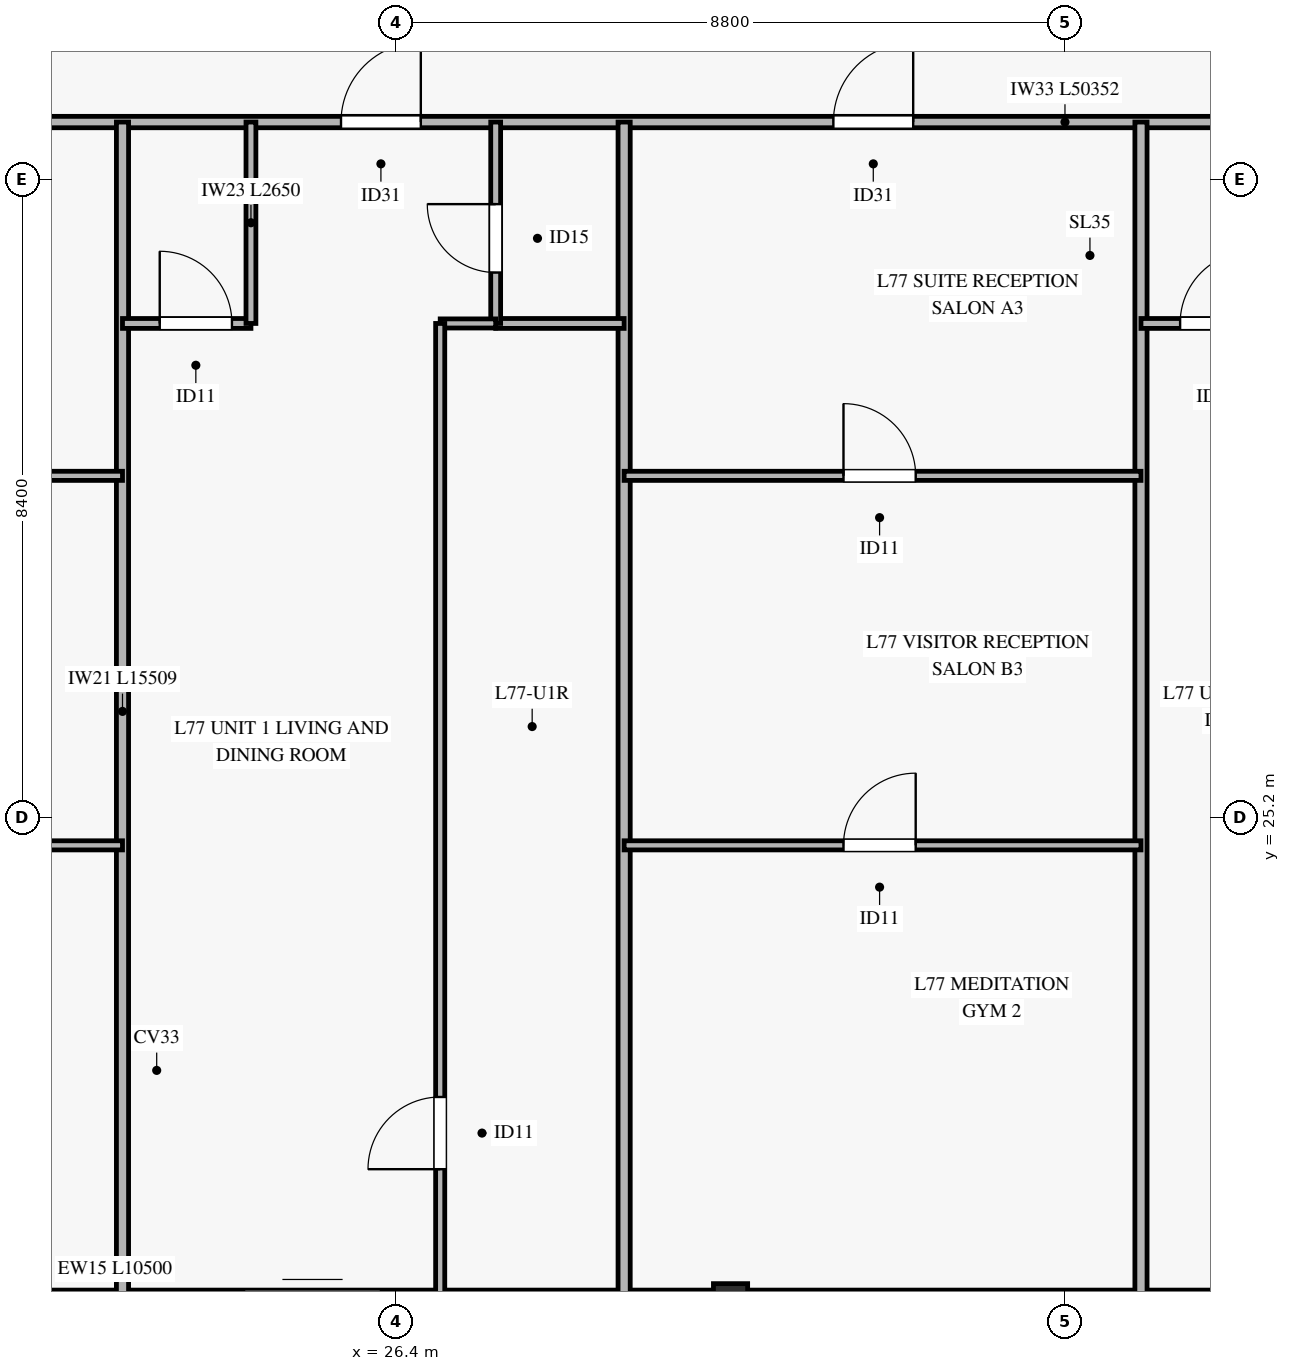
"""IFC4 building model, lengths in metres.
Left out: names, types, materials, properties, quantities, classifications, styles, units other than length and angle.
Written with IfcOpenShell. Run it as: python <this file> out.ifc"""

import sys

from ifc_helpers import new_model, si_unit, direction, frame, frame_2d, origin, origin_2d, place, context, subcontext, project, spatial, rectangle, hollow_rectangle, extrude, source, transform, mapped, element, fill, save


model = new_model("IFC4")
c1 = context("Model", 3, precision=1e-05, world=origin(), true_north=direction((0.0, 1.0)))
c2 = subcontext(c1, "Body", "Model", "MODEL_VIEW")
j1 = project(units=[si_unit("LENGTHUNIT", "METRE"), si_unit("PLANEANGLEUNIT", "RADIAN")], contexts=[c1])
p1 = place(None, origin())
s1 = spatial("IfcSite", under=j1, at=p1, CompositionType="ELEMENT")
p2 = place(p1, origin())
s2 = spatial("IfcBuilding", under=s1, at=p2, CompositionType="ELEMENT")
p3 = place(p2, frame((0.0, 0.0, 300.6)))
s3 = spatial("IfcBuildingStorey", under=s2, at=p3, CompositionType="ELEMENT", Elevation=300.6)
m1 = source(origin(), c2, "Body", "SweptSolid", [
    extrude(hollow_rectangle(XDim=0.45, YDim=0.45, WallThickness=0.022, at=origin_2d()), origin(), (0.0, 0.0, 1.0), 3.318),
])
p4 = place(p3, frame((30.8, 18.841, 0.0), z_axis=(0.0, 0.28055656303, 0.959837494027), x_axis=(-1.0, 0.0, 0.0)))
e1 = element("IfcColumn", 1, at=p4, inside=s3, PredefinedType="COLUMN", context=c2, shape_type="MappedRepresentation", body=[
    mapped(m1, transform((0.0, 0.0, 0.0), x_axis=(1.0, 0.0, 0.0), y_axis=(0.0, 1.0, 0.0), z_axis=(0.0, 0.0, 1.0), scale=1.0)),
])
p5 = place(p3, frame((20.075, 18.841, 0.0), z_axis=(0.0, 0.0, 1.0), x_axis=(1.0, 0.0, 0.0)))
e2 = element("IfcWall", 2, at=p5, inside=s3, PredefinedType="SOLIDWALL", context=c2, shape_type="SweptSolid", body=[
    extrude(rectangle(XDim=10.5, YDim=0.28, at=frame_2d((5.25, 0.0))), origin(), (0.0, 0.0, 1.0), 2.815),
])
p6 = place(p5, frame((4.325, 0.0, 0.0)))
e3 = element("IfcOpeningElement", 3, at=p6, cuts=e2, PredefinedType="OPENING", context=c2, shape_type="SweptSolid", body=[
    extrude(rectangle(XDim=1.8, YDim=2.25, at=frame_2d((0.9, 1.125))), frame((0.0, 0.15, 0.0), z_axis=(0.0, -1.0, 0.0), x_axis=(1.0, 0.0, 0.0)), (0.0, 0.0, 1.0), 0.3),
])
p7 = place(p5, frame((0.517, 0.0, 0.45)))
e4 = element("IfcOpeningElement", 4, at=p7, cuts=e2, PredefinedType="OPENING", context=c2, shape_type="SweptSolid", body=[
    extrude(rectangle(XDim=1.6, YDim=2.0, at=frame_2d((0.8, 1.0))), frame((0.0, 0.15, 0.0), z_axis=(0.0, -1.0, 0.0), x_axis=(1.0, 0.0, 0.0)), (0.0, 0.0, 1.0), 0.3),
])
p8 = place(p5, frame((7.305, 0.0, 0.45)))
e5 = element("IfcOpeningElement", 5, at=p8, cuts=e2, PredefinedType="OPENING", context=c2, shape_type="SweptSolid", body=[
    extrude(rectangle(XDim=1.6, YDim=2.0, at=frame_2d((0.8, 1.0))), frame((0.0, 0.15, 0.0), z_axis=(0.0, -1.0, 0.0), x_axis=(1.0, 0.0, 0.0)), (0.0, 0.0, 1.0), 0.3),
])
p9 = place(p3, frame((31.025, 18.841, 0.0), z_axis=(0.0, 0.0, 1.0), x_axis=(1.0, 0.0, 0.0)))
e6 = element("IfcWall", 6, at=p9, inside=s3, PredefinedType="SOLIDWALL", context=c2, shape_type="SweptSolid", body=[
    extrude(rectangle(XDim=6.3, YDim=0.28, at=frame_2d((3.15, 0.0))), origin(), (0.0, 0.0, 1.0), 2.815),
])
p10 = place(p3, frame((10.024, 34.35, 0.0), z_axis=(0.0, 0.0, 1.0), x_axis=(1.0, 0.0, 0.0)))
e7 = element("IfcWall", 7, at=p10, inside=s3, PredefinedType="PARTITIONING", context=c2, shape_type="SweptSolid", body=[
    extrude(rectangle(XDim=50.352, YDim=0.15, at=frame_2d((25.176, 0.0))), origin(), (0.0, 0.0, 1.0), 2.47),
])
p11 = place(p10, frame((5.406, 0.0, 0.0)))
e8 = element("IfcOpeningElement", 8, at=p11, cuts=e7, PredefinedType="OPENING", context=c2, shape_type="SweptSolid", body=[
    extrude(rectangle(XDim=1.05, YDim=2.15, at=frame_2d((0.525, 1.075))), frame((0.0, 0.085, 0.0), z_axis=(0.0, -1.0, 0.0), x_axis=(1.0, 0.0, 0.0)), (0.0, 0.0, 1.0), 0.17),
])
p12 = place(p10, frame((15.651, 0.0, 0.0)))
e9 = element("IfcOpeningElement", 9, at=p12, cuts=e7, PredefinedType="OPENING", context=c2, shape_type="SweptSolid", body=[
    extrude(rectangle(XDim=1.05, YDim=2.15, at=frame_2d((0.525, 1.075))), frame((0.0, 0.085, 0.0), z_axis=(0.0, -1.0, 0.0), x_axis=(1.0, 0.0, 0.0)), (0.0, 0.0, 1.0), 0.17),
])
p13 = place(p10, frame((22.129, 0.0, 0.0)))
e10 = element("IfcOpeningElement", 10, at=p13, cuts=e7, PredefinedType="OPENING", context=c2, shape_type="SweptSolid", body=[
    extrude(rectangle(XDim=1.05, YDim=2.15, at=frame_2d((0.525, 1.075))), frame((0.0, 0.085, 0.0), z_axis=(0.0, -1.0, 0.0), x_axis=(1.0, 0.0, 0.0)), (0.0, 0.0, 1.0), 0.17),
])
p14 = place(p10, frame((29.151, 0.0, 0.0)))
e11 = element("IfcOpeningElement", 11, at=p14, cuts=e7, PredefinedType="OPENING", context=c2, shape_type="SweptSolid", body=[
    extrude(rectangle(XDim=1.05, YDim=2.15, at=frame_2d((0.525, 1.075))), frame((0.0, 0.085, 0.0), z_axis=(0.0, -1.0, 0.0), x_axis=(1.0, 0.0, 0.0)), (0.0, 0.0, 1.0), 0.17),
])
p15 = place(p10, frame((35.701, 0.0, 0.0)))
e12 = element("IfcOpeningElement", 12, at=p15, cuts=e7, PredefinedType="OPENING", context=c2, shape_type="SweptSolid", body=[
    extrude(rectangle(XDim=1.05, YDim=2.15, at=frame_2d((0.525, 1.075))), frame((0.0, 0.085, 0.0), z_axis=(0.0, -1.0, 0.0), x_axis=(1.0, 0.0, 0.0)), (0.0, 0.0, 1.0), 0.17),
])
p16 = place(p10, frame((43.42, 0.0, 0.0)))
e13 = element("IfcOpeningElement", 13, at=p16, cuts=e7, PredefinedType="OPENING", context=c2, shape_type="SweptSolid", body=[
    extrude(rectangle(XDim=1.05, YDim=2.15, at=frame_2d((0.525, 1.075))), frame((0.0, 0.085, 0.0), z_axis=(0.0, -1.0, 0.0), x_axis=(1.0, 0.0, 0.0)), (0.0, 0.0, 1.0), 0.17),
])
for number, where, z_axis, x_axis in (
    (14, (22.8, 18.841, 0.0), (0.0, 0.0, 1.0), (0.0, 1.0, 0.0)),
    (15, (29.4, 18.841, 0.0), (0.0, 0.0, 1.0), (0.0, 1.0, 0.0)),
    (16, (36.2, 18.841, 0.0), (0.0, 0.0, 1.0), (0.0, 1.0, 0.0)),
):
    element("IfcWall", number, at=place(p3, frame(where, z_axis=z_axis, x_axis=x_axis)), inside=s3, PredefinedType="PARTITIONING", context=c2, shape_type="SweptSolid", body=[
        extrude(rectangle(XDim=15.509, YDim=0.16, at=frame_2d((7.754, 0.0))), origin(), (0.0, 0.0, 1.0), 2.77),
    ])
p17 = place(p3, frame((10.024, 24.833, 0.0), z_axis=(0.0, 0.0, 1.0), x_axis=(1.0, 0.0, 0.0)))
e17 = element("IfcWall", 17, at=p17, inside=s3, PredefinedType="PARTITIONING", context=c2, shape_type="SweptSolid", body=[
    extrude(rectangle(XDim=12.776, YDim=0.12, at=frame_2d((6.388, 0.0))), origin(), (0.0, 0.0, 1.0), 2.47),
])
p18 = place(p17, frame((5.646, 0.0, 0.0)))
e18 = element("IfcOpeningElement", 18, at=p18, cuts=e17, PredefinedType="OPENING", context=c2, shape_type="SweptSolid", body=[
    extrude(rectangle(XDim=0.95, YDim=2.1, at=frame_2d((0.475, 1.05))), frame((0.0, 0.07, 0.0), z_axis=(0.0, -1.0, 0.0), x_axis=(1.0, 0.0, 0.0)), (0.0, 0.0, 1.0), 0.14),
])
p19 = place(p3, frame((10.024, 29.695, 0.0), z_axis=(0.0, 0.0, 1.0), x_axis=(1.0, 0.0, 0.0)))
e19 = element("IfcWall", 19, at=p19, inside=s3, PredefinedType="PARTITIONING", context=c2, shape_type="SweptSolid", body=[
    extrude(rectangle(XDim=12.776, YDim=0.12, at=frame_2d((6.388, 0.0))), origin(), (0.0, 0.0, 1.0), 2.47),
])
p20 = place(p19, frame((5.646, 0.0, 0.0)))
e20 = element("IfcOpeningElement", 20, at=p20, cuts=e19, PredefinedType="OPENING", context=c2, shape_type="SweptSolid", body=[
    extrude(rectangle(XDim=0.95, YDim=2.1, at=frame_2d((0.475, 1.05))), frame((0.0, 0.07, 0.0), z_axis=(0.0, -1.0, 0.0), x_axis=(1.0, 0.0, 0.0)), (0.0, 0.0, 1.0), 0.14),
])
p21 = place(p3, frame((22.8, 31.7, 0.0), z_axis=(0.0, 0.0, 1.0), x_axis=(1.0, 0.0, 0.0)))
e21 = element("IfcWall", 21, at=p21, inside=s3, PredefinedType="PARTITIONING", context=c2, shape_type="SweptSolid", body=[
    extrude(rectangle(XDim=1.69, YDim=0.13, at=frame_2d((0.845, 0.0))), origin(), (0.0, 0.0, 1.0), 3.185),
])
p22 = place(p21, frame((0.49, 0.0, 0.0)))
e22 = element("IfcOpeningElement", 22, at=p22, cuts=e21, PredefinedType="OPENING", context=c2, shape_type="SweptSolid", body=[
    extrude(rectangle(XDim=0.95, YDim=2.1, at=frame_2d((0.475, 1.05))), frame((0.0, 0.075, 0.0), z_axis=(0.0, -1.0, 0.0), x_axis=(1.0, 0.0, 0.0)), (0.0, 0.0, 1.0), 0.15),
])
p23 = place(p3, frame((24.49, 31.7, 0.0), z_axis=(0.0, 0.0, 1.0), x_axis=(0.0, 1.0, 0.0)))
e23 = element("IfcWall", 23, at=p23, inside=s3, PredefinedType="PARTITIONING", context=c2, shape_type="SweptSolid", body=[
    extrude(rectangle(XDim=2.65, YDim=0.13, at=frame_2d((1.325, 0.0))), origin(), (0.0, 0.0, 1.0), 2.77),
])
p24 = place(p3, frame((27.71, 31.7, 0.0), z_axis=(0.0, 0.0, 1.0), x_axis=(1.0, 0.0, 0.0)))
e24 = element("IfcWall", 24, at=p24, inside=s3, PredefinedType="PARTITIONING", context=c2, shape_type="SweptSolid", body=[
    extrude(rectangle(XDim=1.69, YDim=0.13, at=frame_2d((0.845, 0.0))), origin(), (0.0, 0.0, 1.0), 3.185),
])
p25 = place(p3, frame((27.71, 31.7, 0.0), z_axis=(0.0, 0.0, 1.0), x_axis=(0.0, 1.0, 0.0)))
e25 = element("IfcWall", 25, at=p25, inside=s3, PredefinedType="PARTITIONING", context=c2, shape_type="SweptSolid", body=[
    extrude(rectangle(XDim=2.65, YDim=0.13, at=frame_2d((1.325, 0.0))), origin(), (0.0, 0.0, 1.0), 2.77),
])
p26 = place(p25, frame((0.67, 0.0, 0.0)))
e26 = element("IfcOpeningElement", 26, at=p26, cuts=e25, PredefinedType="OPENING", context=c2, shape_type="SweptSolid", body=[
    extrude(rectangle(XDim=0.9, YDim=2.1, at=frame_2d((0.45, 1.05))), frame((0.0, 0.075, 0.0), z_axis=(0.0, -1.0, 0.0), x_axis=(1.0, 0.0, 0.0)), (0.0, 0.0, 1.0), 0.15),
])
p27 = place(p3, frame((26.98, 31.7, 0.0), z_axis=(0.0, 0.0, 1.0), x_axis=(1.0, 0.0, 0.0)))
e27 = element("IfcWall", 27, at=p27, inside=s3, PredefinedType="PARTITIONING", context=c2, shape_type="SweptSolid", body=[
    extrude(rectangle(XDim=0.73, YDim=0.12, at=frame_2d((0.365, 0.0))), origin(), (0.0, 0.0, 1.0), 3.185),
])
p28 = place(p3, frame((26.98, 18.841, 0.0), z_axis=(0.0, 0.0, 1.0), x_axis=(0.0, 1.0, 0.0)))
e28 = element("IfcWall", 28, at=p28, inside=s3, PredefinedType="PARTITIONING", context=c2, shape_type="SweptSolid", body=[
    extrude(rectangle(XDim=12.859, YDim=0.12, at=frame_2d((6.429, 0.0))), origin(), (0.0, 0.0, 1.0), 2.77),
])
p29 = place(p28, frame((1.731, 0.0, 0.0)))
e29 = element("IfcOpeningElement", 29, at=p29, cuts=e28, PredefinedType="OPENING", context=c2, shape_type="SweptSolid", body=[
    extrude(rectangle(XDim=0.95, YDim=2.1, at=frame_2d((0.475, 1.05))), frame((0.0, 0.07, 0.0), z_axis=(0.0, -1.0, 0.0), x_axis=(1.0, 0.0, 0.0)), (0.0, 0.0, 1.0), 0.14),
])
p30 = place(p3, frame((29.4, 24.833, 0.0), z_axis=(0.0, 0.0, 1.0), x_axis=(1.0, 0.0, 0.0)))
e30 = element("IfcWall", 30, at=p30, inside=s3, PredefinedType="PARTITIONING", context=c2, shape_type="SweptSolid", body=[
    extrude(rectangle(XDim=6.8, YDim=0.12, at=frame_2d((3.4, 0.0))), origin(), (0.0, 0.0, 1.0), 2.47),
])
p31 = place(p30, frame((2.886, 0.0, 0.0)))
e31 = element("IfcOpeningElement", 31, at=p31, cuts=e30, PredefinedType="OPENING", context=c2, shape_type="SweptSolid", body=[
    extrude(rectangle(XDim=0.95, YDim=2.1, at=frame_2d((0.475, 1.05))), frame((0.0, 0.07, 0.0), z_axis=(0.0, -1.0, 0.0), x_axis=(1.0, 0.0, 0.0)), (0.0, 0.0, 1.0), 0.14),
])
p32 = place(p3, frame((29.4, 29.695, 0.0), z_axis=(0.0, 0.0, 1.0), x_axis=(1.0, 0.0, 0.0)))
e32 = element("IfcWall", 32, at=p32, inside=s3, PredefinedType="PARTITIONING", context=c2, shape_type="SweptSolid", body=[
    extrude(rectangle(XDim=6.8, YDim=0.12, at=frame_2d((3.4, 0.0))), origin(), (0.0, 0.0, 1.0), 2.47),
])
p33 = place(p32, frame((2.886, 0.0, 0.0)))
e33 = element("IfcOpeningElement", 33, at=p33, cuts=e32, PredefinedType="OPENING", context=c2, shape_type="SweptSolid", body=[
    extrude(rectangle(XDim=0.95, YDim=2.1, at=frame_2d((0.475, 1.05))), frame((0.0, 0.07, 0.0), z_axis=(0.0, -1.0, 0.0), x_axis=(1.0, 0.0, 0.0)), (0.0, 0.0, 1.0), 0.14),
])
p34 = place(p3, frame((36.2, 31.7, 0.0), z_axis=(0.0, 0.0, 1.0), x_axis=(1.0, 0.0, 0.0)))
e34 = element("IfcWall", 34, at=p34, inside=s3, PredefinedType="PARTITIONING", context=c2, shape_type="SweptSolid", body=[
    extrude(rectangle(XDim=1.74, YDim=0.13, at=frame_2d((0.87, 0.0))), origin(), (0.0, 0.0, 1.0), 2.47),
])
p35 = place(p34, frame((0.515, 0.0, 0.0)))
e35 = element("IfcOpeningElement", 35, at=p35, cuts=e34, PredefinedType="OPENING", context=c2, shape_type="SweptSolid", body=[
    extrude(rectangle(XDim=0.95, YDim=2.1, at=frame_2d((0.475, 1.05))), frame((0.0, 0.075, 0.0), z_axis=(0.0, -1.0, 0.0), x_axis=(1.0, 0.0, 0.0)), (0.0, 0.0, 1.0), 0.15),
])
m2 = source(origin(), c2, "Body", "SweptSolid", [
    extrude(rectangle(XDim=1.05, YDim=2.15, at=frame_2d((0.525, 1.075))), frame((0.0, 0.025, 0.0), z_axis=(0.0, -1.0, 0.0), x_axis=(1.0, 0.0, 0.0)), (0.0, 0.0, 1.0), 0.05),
])
p36 = place(p12, origin())
e36 = element("IfcDoor", 36, at=p36, inside=s3, OperationType="SINGLE_SWING_RIGHT", PredefinedType="DOOR", context=c2, shape_type="MappedRepresentation", body=[
    mapped(m2, transform((0.0, 0.0, 0.0), x_axis=(1.0, 0.0, 0.0), y_axis=(0.0, 1.0, 0.0), z_axis=(0.0, 0.0, 1.0), scale=1.0)),
])
fill(e9, e36)
m3 = source(origin(), c2, "Body", "SweptSolid", [
    extrude(rectangle(XDim=0.95, YDim=2.1, at=frame_2d((0.475, 1.05))), frame((0.0, 0.025, 0.0), z_axis=(0.0, -1.0, 0.0), x_axis=(1.0, 0.0, 0.0)), (0.0, 0.0, 1.0), 0.05),
])
p37 = place(p22, origin())
e37 = element("IfcDoor", 37, at=p37, inside=s3, OperationType="SINGLE_SWING_LEFT", PredefinedType="DOOR", context=c2, shape_type="MappedRepresentation", body=[
    mapped(m3, transform((0.0, 0.0, 0.0), x_axis=(1.0, 0.0, 0.0), y_axis=(0.0, 1.0, 0.0), z_axis=(0.0, 0.0, 1.0), scale=1.0)),
])
fill(e22, e37)
m4 = source(origin(), c2, "Body", "SweptSolid", [
    extrude(rectangle(XDim=0.9, YDim=2.1, at=frame_2d((0.45, 1.05))), frame((0.0, 0.025, 0.0), z_axis=(0.0, -1.0, 0.0), x_axis=(1.0, 0.0, 0.0)), (0.0, 0.0, 1.0), 0.05),
])
p38 = place(p26, origin())
e38 = element("IfcDoor", 38, at=p38, inside=s3, OperationType="SINGLE_SWING_RIGHT", PredefinedType="DOOR", context=c2, shape_type="MappedRepresentation", body=[
    mapped(m4, transform((0.0, 0.0, 0.0), x_axis=(1.0, 0.0, 0.0), y_axis=(0.0, 1.0, 0.0), z_axis=(0.0, 0.0, 1.0), scale=1.0)),
])
fill(e26, e38)
p39 = place(p29, origin())
e39 = element("IfcDoor", 39, at=p39, inside=s3, OperationType="SINGLE_SWING_LEFT", PredefinedType="DOOR", context=c2, shape_type="MappedRepresentation", body=[
    mapped(m3, transform((0.0, 0.0, 0.0), x_axis=(1.0, 0.0, 0.0), y_axis=(0.0, 1.0, 0.0), z_axis=(0.0, 0.0, 1.0), scale=1.0)),
])
fill(e29, e39)
p40 = place(p13, origin())
e40 = element("IfcDoor", 40, at=p40, inside=s3, OperationType="SINGLE_SWING_RIGHT", PredefinedType="DOOR", context=c2, shape_type="MappedRepresentation", body=[
    mapped(m2, transform((0.0, 0.0, 0.0), x_axis=(1.0, 0.0, 0.0), y_axis=(0.0, 1.0, 0.0), z_axis=(0.0, 0.0, 1.0), scale=1.0)),
])
fill(e10, e40)
p41 = place(p33, origin())
e41 = element("IfcDoor", 41, at=p41, inside=s3, OperationType="SINGLE_SWING_LEFT", PredefinedType="DOOR", context=c2, shape_type="MappedRepresentation", body=[
    mapped(m3, transform((0.0, 0.0, 0.0), x_axis=(1.0, 0.0, 0.0), y_axis=(0.0, 1.0, 0.0), z_axis=(0.0, 0.0, 1.0), scale=1.0)),
])
fill(e33, e41)
p42 = place(p31, origin())
e42 = element("IfcDoor", 42, at=p42, inside=s3, OperationType="SINGLE_SWING_RIGHT", PredefinedType="DOOR", context=c2, shape_type="MappedRepresentation", body=[
    mapped(m3, transform((0.0, 0.0, 0.0), x_axis=(1.0, 0.0, 0.0), y_axis=(0.0, 1.0, 0.0), z_axis=(0.0, 0.0, 1.0), scale=1.0)),
])
fill(e31, e42)
p43 = place(p35, origin())
e43 = element("IfcDoor", 43, at=p43, inside=s3, OperationType="SINGLE_SWING_RIGHT", PredefinedType="DOOR", context=c2, shape_type="MappedRepresentation", body=[
    mapped(m3, transform((0.0, 0.0, 0.0), x_axis=(1.0, 0.0, 0.0), y_axis=(0.0, 1.0, 0.0), z_axis=(0.0, 0.0, 1.0), scale=1.0)),
])
fill(e35, e43)
save(model, sys.argv[1])
